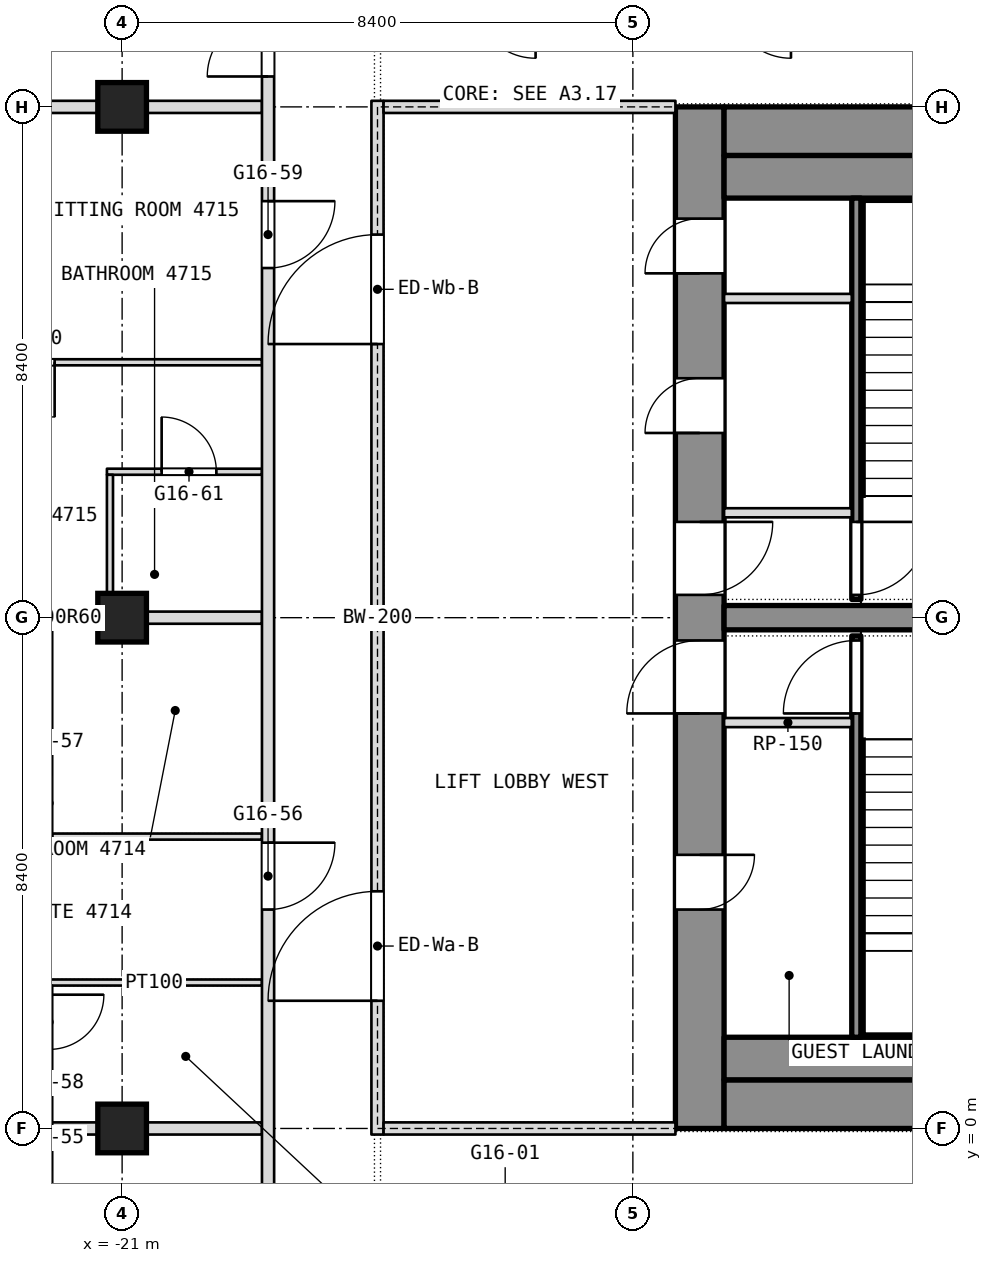
"""IFC4 building model, lengths in metres.
Left out: names, types, materials, properties, quantities, classifications, styles, units other than length and angle.
Written with IfcOpenShell. Run it as: python <this file> out.ifc"""

import sys

from ifc_helpers import new_model, si_unit, direction, frame, frame_2d, origin, origin_2d, place, context, subcontext, project, spatial, rectangle, extrude, element, fill, save


model = new_model("IFC4")
c1 = context("Model", 3, precision=1e-05, world=origin(), true_north=direction((0.0, 1.0)))
c2 = subcontext(c1, "Body", "Model", "MODEL_VIEW")
j1 = project(units=[si_unit("LENGTHUNIT", "METRE"), si_unit("PLANEANGLEUNIT", "RADIAN")], contexts=[c1])
p1 = place(None, origin())
s1 = spatial("IfcSite", under=j1, at=p1, CompositionType="ELEMENT")
p2 = place(p1, origin())
s2 = spatial("IfcBuilding", under=s1, at=p2, CompositionType="ELEMENT")
p3 = place(p2, frame((0.0, 0.0, 205.7)))
s3 = spatial("IfcBuildingStorey", under=s2, at=p3, CompositionType="ELEMENT", Elevation=205.7)
p4 = place(p3, frame((-11.5, 0.0, 0.0), z_axis=(0.0, 0.0, 1.0), x_axis=(0.0, 1.0, 0.0)))
e1 = element("IfcWall", 1, at=p4, inside=s3, PredefinedType="SHEAR", context=c2, shape_type="SweptSolid", body=[
    extrude(rectangle(XDim=16.8, YDim=0.8, at=frame_2d((8.4, 0.0))), origin(), (0.0, 0.0, 1.0), 3.6),
])
p5 = place(p4, frame((3.6, 0.0, 0.0)))
e2 = element("IfcOpeningElement", 2, at=p5, cuts=e1, PredefinedType="OPENING", context=c2, shape_type="SweptSolid", body=[
    extrude(rectangle(XDim=0.9, YDim=2.1, at=frame_2d((0.45, 1.05))), frame((0.0, 0.4, 0.0), z_axis=(0.0, -1.0, 0.0), x_axis=(1.0, 0.0, 0.0)), (0.0, 0.0, 1.0), 0.8),
])
p6 = place(p4, frame((6.825, 0.0, 0.0)))
e3 = element("IfcOpeningElement", 3, at=p6, cuts=e1, PredefinedType="OPENING", context=c2, shape_type="SweptSolid", body=[
    extrude(rectangle(XDim=1.2, YDim=2.1, at=frame_2d((0.6, 1.05))), frame((0.0, 0.4, 0.0), z_axis=(0.0, -1.0, 0.0), x_axis=(1.0, 0.0, 0.0)), (0.0, 0.0, 1.0), 0.8),
])
p7 = place(p4, frame((14.062, 0.0, 0.0)))
e4 = element("IfcOpeningElement", 4, at=p7, cuts=e1, PredefinedType="OPENING", context=c2, shape_type="SweptSolid", body=[
    extrude(rectangle(XDim=0.9, YDim=2.1, at=frame_2d((0.45, 1.05))), frame((0.0, 0.4, 0.0), z_axis=(0.0, -1.0, 0.0), x_axis=(1.0, 0.0, 0.0)), (0.0, 0.0, 1.0), 0.8),
])
p8 = place(p4, frame((11.438, 0.0, 0.0)))
e5 = element("IfcOpeningElement", 5, at=p8, cuts=e1, PredefinedType="OPENING", context=c2, shape_type="SweptSolid", body=[
    extrude(rectangle(XDim=0.9, YDim=2.1, at=frame_2d((0.45, 1.05))), frame((0.0, 0.4, 0.0), z_axis=(0.0, -1.0, 0.0), x_axis=(1.0, 0.0, 0.0)), (0.0, 0.0, 1.0), 0.8),
])
p9 = place(p4, frame((8.775, 0.0, 0.0)))
e6 = element("IfcOpeningElement", 6, at=p9, cuts=e1, PredefinedType="OPENING", context=c2, shape_type="SweptSolid", body=[
    extrude(rectangle(XDim=1.2, YDim=2.1, at=frame_2d((0.6, 1.05))), frame((0.0, 0.4, 0.0), z_axis=(0.0, -1.0, 0.0), x_axis=(1.0, 0.0, 0.0)), (0.0, 0.0, 1.0), 0.8),
])
for number, where, z_axis, x_axis in (
    (7, (-11.1, 0.4, 0.0), (0.0, 0.0, 1.0), (1.0, 0.0, 0.0)),
    (8, (-11.1, 16.4, 0.0), (0.0, 0.0, 1.0), (1.0, 0.0, 0.0)),
):
    element("IfcWall", number, at=place(p3, frame(where, z_axis=z_axis, x_axis=x_axis)), inside=s3, PredefinedType="SHEAR", context=c2, shape_type="SweptSolid", body=[
        extrude(rectangle(XDim=22.2, YDim=0.8, at=frame_2d((11.1, 0.0))), origin(), (0.0, 0.0, 1.0), 3.6),
    ])
p10 = place(p3, frame((-11.1, 8.4, 0.0), z_axis=(0.0, 0.0, 1.0), x_axis=(1.0, 0.0, 0.0)))
e9 = element("IfcWall", 9, at=p10, inside=s3, PredefinedType="SHEAR", context=c2, shape_type="SweptSolid", body=[
    extrude(rectangle(XDim=6.7, YDim=0.4, at=frame_2d((3.35, 0.0))), origin(), (0.0, 0.0, 1.0), 3.6),
])
for number, where, z_axis, x_axis in (
    (10, (-21.0, 0.0, 0.0), (0.0, 0.0, 1.0), (1.0, 0.0, 0.0)),
    (11, (-21.0, 8.4, 0.0), (0.0, 0.0, 1.0), (1.0, 0.0, 0.0)),
    (12, (-21.0, 16.8, 0.0), (0.0, 0.0, 1.0), (1.0, 0.0, 0.0)),
):
    element("IfcColumn", number, at=place(p3, frame(where, z_axis=z_axis, x_axis=x_axis)), inside=s3, PredefinedType="COLUMN", context=c2, shape_type="SweptSolid", body=[
        extrude(rectangle(XDim=0.8, YDim=0.8, at=origin_2d()), origin(), (0.0, 0.0, 1.0), 3.6),
    ])
p11 = place(p3, frame((-25.5, 0.0, 0.0), z_axis=(0.0, 0.0, 1.0), x_axis=(1.0, 0.0, 0.0)))
e13 = element("IfcWall", 13, at=p11, inside=s3, PredefinedType="PARTITIONING", context=c2, shape_type="SweptSolid", body=[
    extrude(rectangle(XDim=6.8, YDim=0.2, at=frame_2d((3.4, 0.0))), origin(), (0.0, 0.0, 1.0), 2.94),
])
p12 = place(p3, frame((-22.25, 2.4, 0.0), z_axis=(0.0, 0.0, 1.0), x_axis=(1.0, 0.0, 0.0)))
e14 = element("IfcWall", 14, at=p12, inside=s3, PredefinedType="PARTITIONING", context=c2, shape_type="SweptSolid", body=[
    extrude(rectangle(XDim=3.55, YDim=0.1, at=frame_2d((1.775, 0.0))), origin(), (0.0, 0.0, 1.0), 3.34),
])
p13 = place(p3, frame((-22.15, 4.8, 0.0), z_axis=(0.0, 0.0, 1.0), x_axis=(1.0, 0.0, 0.0)))
e15 = element("IfcWall", 15, at=p13, inside=s3, PredefinedType="PARTITIONING", context=c2, shape_type="SweptSolid", body=[
    extrude(rectangle(XDim=3.45, YDim=0.1, at=frame_2d((1.725, 0.0))), origin(), (0.0, 0.0, 1.0), 3.34),
])
p14 = place(p3, frame((-25.5, 8.4, 0.0), z_axis=(0.0, 0.0, 1.0), x_axis=(1.0, 0.0, 0.0)))
e16 = element("IfcWall", 16, at=p14, inside=s3, PredefinedType="PARTITIONING", context=c2, shape_type="SweptSolid", body=[
    extrude(rectangle(XDim=6.8, YDim=0.2, at=frame_2d((3.4, 0.0))), origin(), (0.0, 0.0, 1.0), 2.94),
])
p15 = place(p3, frame((-21.25, 10.8, 0.0), z_axis=(0.0, 0.0, 1.0), x_axis=(1.0, 0.0, 0.0)))
e17 = element("IfcWall", 17, at=p15, inside=s3, PredefinedType="PARTITIONING", context=c2, shape_type="SweptSolid", body=[
    extrude(rectangle(XDim=2.55, YDim=0.1, at=frame_2d((1.275, 0.0))), origin(), (0.0, 0.0, 1.0), 3.34),
])
p16 = place(p15, frame((0.9, 0.0, 0.0)))
e18 = element("IfcOpeningElement", 18, at=p16, cuts=e17, PredefinedType="OPENING", context=c2, shape_type="SweptSolid", body=[
    extrude(rectangle(XDim=0.9, YDim=2.1, at=frame_2d((0.45, 1.05))), frame((0.0, 0.05, 0.0), z_axis=(0.0, -1.0, 0.0), x_axis=(1.0, 0.0, 0.0)), (0.0, 0.0, 1.0), 0.1),
])
p17 = place(p3, frame((-25.5, 12.6, 0.0), z_axis=(0.0, 0.0, 1.0), x_axis=(1.0, 0.0, 0.0)))
e19 = element("IfcWall", 19, at=p17, inside=s3, PredefinedType="PARTITIONING", context=c2, shape_type="SweptSolid", body=[
    extrude(rectangle(XDim=6.8, YDim=0.1, at=frame_2d((3.4, 0.0))), origin(), (0.0, 0.0, 1.0), 3.34),
])
p18 = place(p17, frame((2.49, 0.0, 0.0)))
e20 = element("IfcOpeningElement", 20, at=p18, cuts=e19, PredefinedType="OPENING", context=c2, shape_type="SweptSolid", body=[
    extrude(rectangle(XDim=0.9, YDim=2.1, at=frame_2d((0.45, 1.05))), frame((0.0, 0.05, 0.0), z_axis=(0.0, -1.0, 0.0), x_axis=(1.0, 0.0, 0.0)), (0.0, 0.0, 1.0), 0.1),
])
p19 = place(p3, frame((-25.447, 16.8, 0.0), z_axis=(0.0, 0.0, 1.0), x_axis=(1.0, 0.0, 0.0)))
e21 = element("IfcWall", 21, at=p19, inside=s3, PredefinedType="PARTITIONING", context=c2, shape_type="SweptSolid", body=[
    extrude(rectangle(XDim=6.747, YDim=0.2, at=frame_2d((3.374, 0.0))), origin(), (0.0, 0.0, 1.0), 2.94),
])
p20 = place(p3, frame((-18.6, -26.751, 0.0), z_axis=(0.0, 0.0, 1.0), x_axis=(0.0, 1.0, 0.0)))
e22 = element("IfcWall", 22, at=p20, inside=s3, PredefinedType="PARTITIONING", context=c2, shape_type="SweptSolid", body=[
    extrude(rectangle(XDim=49.091, YDim=0.2, at=frame_2d((24.545, 0.0))), origin(), (0.0, 0.0, 1.0), 3.34),
])
p21 = place(p20, frame((4.576, 0.0, 0.0)))
e23 = element("IfcOpeningElement", 23, at=p21, cuts=e22, PredefinedType="OPENING", context=c2, shape_type="SweptSolid", body=[
    extrude(rectangle(XDim=1.1, YDim=2.1, at=frame_2d((0.55, 1.05))), frame((0.0, 0.1, 0.0), z_axis=(0.0, -1.0, 0.0), x_axis=(1.0, 0.0, 0.0)), (0.0, 0.0, 1.0), 0.2),
])
p22 = place(p20, frame((10.351, 0.0, 0.0)))
e24 = element("IfcOpeningElement", 24, at=p22, cuts=e22, PredefinedType="OPENING", context=c2, shape_type="SweptSolid", body=[
    extrude(rectangle(XDim=1.0, YDim=2.1, at=frame_2d((0.5, 1.05))), frame((0.0, 0.1, 0.0), z_axis=(0.0, -1.0, 0.0), x_axis=(1.0, 0.0, 0.0)), (0.0, 0.0, 1.0), 0.2),
])
p23 = place(p20, frame((16.951, 0.0, 0.0)))
e25 = element("IfcOpeningElement", 25, at=p23, cuts=e22, PredefinedType="OPENING", context=c2, shape_type="SweptSolid", body=[
    extrude(rectangle(XDim=1.0, YDim=2.1, at=frame_2d((0.5, 1.05))), frame((0.0, 0.1, 0.0), z_axis=(0.0, -1.0, 0.0), x_axis=(1.0, 0.0, 0.0)), (0.0, 0.0, 1.0), 0.2),
])
p24 = place(p20, frame((22.051, 0.0, 0.0)))
e26 = element("IfcOpeningElement", 26, at=p24, cuts=e22, PredefinedType="OPENING", context=c2, shape_type="SweptSolid", body=[
    extrude(rectangle(XDim=1.1, YDim=2.1, at=frame_2d((0.55, 1.05))), frame((0.0, 0.1, 0.0), z_axis=(0.0, -1.0, 0.0), x_axis=(1.0, 0.0, 0.0)), (0.0, 0.0, 1.0), 0.2),
])
p25 = place(p20, frame((30.351, 0.0, 0.0)))
e27 = element("IfcOpeningElement", 27, at=p25, cuts=e22, PredefinedType="OPENING", context=c2, shape_type="SweptSolid", body=[
    extrude(rectangle(XDim=1.1, YDim=2.1, at=frame_2d((0.55, 1.05))), frame((0.0, 0.1, 0.0), z_axis=(0.0, -1.0, 0.0), x_axis=(1.0, 0.0, 0.0)), (0.0, 0.0, 1.0), 0.2),
])
p26 = place(p20, frame((40.901, 0.0, 0.0)))
e28 = element("IfcOpeningElement", 28, at=p26, cuts=e22, PredefinedType="OPENING", context=c2, shape_type="SweptSolid", body=[
    extrude(rectangle(XDim=1.1, YDim=2.1, at=frame_2d((0.55, 1.05))), frame((0.0, 0.1, 0.0), z_axis=(0.0, -1.0, 0.0), x_axis=(1.0, 0.0, 0.0)), (0.0, 0.0, 1.0), 0.2),
])
p27 = place(p20, frame((44.051, 0.0, 0.0)))
e29 = element("IfcOpeningElement", 29, at=p27, cuts=e22, PredefinedType="OPENING", context=c2, shape_type="SweptSolid", body=[
    extrude(rectangle(XDim=1.0, YDim=2.1, at=frame_2d((0.5, 1.05))), frame((0.0, 0.1, 0.0), z_axis=(0.0, -1.0, 0.0), x_axis=(1.0, 0.0, 0.0)), (0.0, 0.0, 1.0), 0.2),
])
p28 = place(p3, frame((-21.2, 8.5, 0.0), z_axis=(0.0, 0.0, 1.0), x_axis=(0.0, 1.0, 0.0)))
e30 = element("IfcWall", 30, at=p28, inside=s3, PredefinedType="PARTITIONING", context=c2, shape_type="SweptSolid", body=[
    extrude(rectangle(XDim=2.25, YDim=0.1, at=frame_2d((1.125, 0.0))), origin(), (0.0, 0.0, 1.0), 3.34),
])
for number, where, z_axis, x_axis in (
    (31, (-11.1, 1.15, 0.0), (0.0, 0.0, 1.0), (1.0, 0.0, 0.0)),
    (32, (-11.1, 15.65, 0.0), (0.0, 0.0, 1.0), (1.0, 0.0, 0.0)),
):
    element("IfcWall", number, at=place(p3, frame(where, z_axis=z_axis, x_axis=x_axis)), inside=s3, PredefinedType="PARTITIONING", context=c2, shape_type="SweptSolid", body=[
        extrude(rectangle(XDim=22.2, YDim=0.7, at=frame_2d((11.1, 0.0))), origin(), (0.0, 0.0, 1.0), 3.34),
    ])
p29 = place(p3, frame((-8.925, 1.5, 0.0), z_axis=(0.0, 0.0, 1.0), x_axis=(0.0, 1.0, 0.0)))
e33 = element("IfcWall", 33, at=p29, inside=s3, PredefinedType="SHEAR", context=c2, shape_type="SweptSolid", body=[
    extrude(rectangle(XDim=6.6, YDim=0.15, at=frame_2d((3.3, 0.0))), origin(), (0.0, 0.0, 1.0), 3.34),
])
p30 = place(p29, frame((5.325, 0.0, 0.0)))
e34 = element("IfcOpeningElement", 34, at=p30, cuts=e33, PredefinedType="OPENING", context=c2, shape_type="SweptSolid", body=[
    extrude(rectangle(XDim=1.2, YDim=2.1, at=frame_2d((0.6, 1.05))), frame((0.0, 0.075, 0.0), z_axis=(0.0, -1.0, 0.0), x_axis=(1.0, 0.0, 0.0)), (0.0, 0.0, 1.0), 0.15),
])
p31 = place(p3, frame((-11.1, 6.675, 0.0), z_axis=(0.0, 0.0, 1.0), x_axis=(1.0, 0.0, 0.0)))
e35 = element("IfcWall", 35, at=p31, inside=s3, PredefinedType="PARTITIONING", context=c2, shape_type="SweptSolid", body=[
    extrude(rectangle(XDim=2.1, YDim=0.15, at=frame_2d((1.05, 0.0))), origin(), (0.0, 0.0, 1.0), 3.34),
])
p32 = place(p3, frame((-8.925, 8.7, 0.0), z_axis=(0.0, 0.0, 1.0), x_axis=(0.0, 1.0, 0.0)))
e36 = element("IfcWall", 36, at=p32, inside=s3, PredefinedType="SHEAR", context=c2, shape_type="SweptSolid", body=[
    extrude(rectangle(XDim=6.6, YDim=0.15, at=frame_2d((3.3, 0.0))), origin(), (0.0, 0.0, 1.0), 3.34),
])
p33 = place(p32, frame((0.075, 0.0, 0.0)))
e37 = element("IfcOpeningElement", 37, at=p33, cuts=e36, PredefinedType="OPENING", context=c2, shape_type="SweptSolid", body=[
    extrude(rectangle(XDim=1.2, YDim=2.1, at=frame_2d((0.6, 1.05))), frame((0.0, 0.075, 0.0), z_axis=(0.0, -1.0, 0.0), x_axis=(1.0, 0.0, 0.0)), (0.0, 0.0, 1.0), 0.15),
])
for number, where, z_axis, x_axis in (
    (38, (-11.1, 10.125, 0.0), (0.0, 0.0, 1.0), (1.0, 0.0, 0.0)),
    (39, (-11.1, 13.65, 0.0), (0.0, 0.0, 1.0), (1.0, 0.0, 0.0)),
):
    element("IfcWall", number, at=place(p3, frame(where, z_axis=z_axis, x_axis=x_axis)), inside=s3, PredefinedType="PARTITIONING", context=c2, shape_type="SweptSolid", body=[
        extrude(rectangle(XDim=2.1, YDim=0.15, at=frame_2d((1.05, 0.0))), origin(), (0.0, 0.0, 1.0), 3.34),
    ])
p34 = place(p3, frame((-16.8, -0.1, 0.0), z_axis=(0.0, 0.0, 1.0), x_axis=(0.0, 1.0, 0.0)))
e40 = element("IfcWall", 40, at=p34, inside=s3, PredefinedType="PARTITIONING", context=c2, shape_type="SweptSolid", body=[
    extrude(rectangle(XDim=17.0, YDim=0.2, at=frame_2d((8.5, 0.0))), origin(), (0.0, 0.0, 1.0), 3.34),
])
p35 = place(p34, frame((2.2, 0.0, 0.0)))
e41 = element("IfcOpeningElement", 41, at=p35, cuts=e40, PredefinedType="OPENING", context=c2, shape_type="SweptSolid", body=[
    extrude(rectangle(XDim=1.8, YDim=2.1, at=frame_2d((0.9, 1.05))), frame((0.0, 0.1, 0.0), z_axis=(0.0, -1.0, 0.0), x_axis=(1.0, 0.0, 0.0)), (0.0, 0.0, 1.0), 0.2),
])
p36 = place(p34, frame((13.0, 0.0, 0.0)))
e42 = element("IfcOpeningElement", 42, at=p36, cuts=e40, PredefinedType="OPENING", context=c2, shape_type="SweptSolid", body=[
    extrude(rectangle(XDim=1.8, YDim=2.1, at=frame_2d((0.9, 1.05))), frame((0.0, 0.1, 0.0), z_axis=(0.0, -1.0, 0.0), x_axis=(1.0, 0.0, 0.0)), (0.0, 0.0, 1.0), 0.2),
])
for number, where, z_axis, x_axis in (
    (43, (-16.7, 0.0, 0.0), (0.0, 0.0, 1.0), (1.0, 0.0, 0.0)),
    (44, (-16.7, 16.8, 0.0), (0.0, 0.0, 1.0), (1.0, 0.0, 0.0)),
):
    element("IfcWall", number, at=place(p3, frame(where, z_axis=z_axis, x_axis=x_axis)), inside=s3, PredefinedType="PARTITIONING", context=c2, shape_type="SweptSolid", body=[
        extrude(rectangle(XDim=4.8, YDim=0.2, at=frame_2d((2.4, 0.0))), origin(), (0.0, 0.0, 1.0), 2.94),
    ])
p37 = place(p16, origin())
e45 = element("IfcDoor", 45, at=p37, inside=s3, OperationType="SINGLE_SWING_LEFT", PredefinedType="DOOR", context=c2, shape_type="SweptSolid", body=[
    extrude(rectangle(XDim=0.9, YDim=2.1, at=frame_2d((0.45, 1.05))), frame((0.0, 0.025, 0.0), z_axis=(0.0, -1.0, 0.0), x_axis=(1.0, 0.0, 0.0)), (0.0, 0.0, 1.0), 0.05),
])
fill(e18, e45)
p38 = place(p18, origin())
e46 = element("IfcDoor", 46, at=p38, inside=s3, OperationType="SINGLE_SWING_RIGHT", PredefinedType="DOOR", context=c2, shape_type="SweptSolid", body=[
    extrude(rectangle(XDim=0.9, YDim=2.1, at=frame_2d((0.45, 1.05))), frame((0.0, 0.025, 0.0), z_axis=(0.0, -1.0, 0.0), x_axis=(1.0, 0.0, 0.0)), (0.0, 0.0, 1.0), 0.05),
])
fill(e20, e46)
p39 = place(p25, origin())
e47 = element("IfcDoor", 47, at=p39, inside=s3, OperationType="SINGLE_SWING_RIGHT", PredefinedType="DOOR", context=c2, shape_type="SweptSolid", body=[
    extrude(rectangle(XDim=1.1, YDim=2.1, at=frame_2d((0.55, 1.05))), frame((0.0, 0.025, 0.0), z_axis=(0.0, -1.0, 0.0), x_axis=(1.0, 0.0, 0.0)), (0.0, 0.0, 1.0), 0.05),
])
fill(e27, e47)
p40 = place(p26, origin())
e48 = element("IfcDoor", 48, at=p40, inside=s3, OperationType="SINGLE_SWING_RIGHT", PredefinedType="DOOR", context=c2, shape_type="SweptSolid", body=[
    extrude(rectangle(XDim=1.1, YDim=2.1, at=frame_2d((0.55, 1.05))), frame((0.0, 0.025, 0.0), z_axis=(0.0, -1.0, 0.0), x_axis=(1.0, 0.0, 0.0)), (0.0, 0.0, 1.0), 0.05),
])
fill(e28, e48)
p41 = place(p27, origin())
e49 = element("IfcDoor", 49, at=p41, inside=s3, OperationType="SINGLE_SWING_LEFT", PredefinedType="DOOR", context=c2, shape_type="SweptSolid", body=[
    extrude(rectangle(XDim=1.0, YDim=2.1, at=frame_2d((0.5, 1.05))), frame((0.0, 0.025, 0.0), z_axis=(0.0, -1.0, 0.0), x_axis=(1.0, 0.0, 0.0)), (0.0, 0.0, 1.0), 0.05),
])
fill(e29, e49)
p42 = place(p5, origin())
e50 = element("IfcDoor", 50, at=p42, inside=s3, OperationType="SINGLE_SWING_LEFT", PredefinedType="DOOR", context=c2, shape_type="SweptSolid", body=[
    extrude(rectangle(XDim=0.9, YDim=2.1, at=frame_2d((0.45, 1.05))), frame((0.0, 0.025, 0.0), z_axis=(0.0, -1.0, 0.0), x_axis=(1.0, 0.0, 0.0)), (0.0, 0.0, 1.0), 0.05),
])
fill(e2, e50)
p43 = place(p6, origin())
e51 = element("IfcDoor", 51, at=p43, inside=s3, OperationType="SINGLE_SWING_LEFT", PredefinedType="DOOR", context=c2, shape_type="SweptSolid", body=[
    extrude(rectangle(XDim=1.2, YDim=2.1, at=frame_2d((0.6, 1.05))), frame((0.0, 0.025, 0.0), z_axis=(0.0, -1.0, 0.0), x_axis=(1.0, 0.0, 0.0)), (0.0, 0.0, 1.0), 0.05),
])
fill(e3, e51)
p44 = place(p30, origin())
e52 = element("IfcDoor", 52, at=p44, inside=s3, OperationType="SINGLE_SWING_LEFT", PredefinedType="DOOR", context=c2, shape_type="SweptSolid", body=[
    extrude(rectangle(XDim=1.2, YDim=2.1, at=frame_2d((0.6, 1.05))), frame((0.0, 0.025, 0.0), z_axis=(0.0, -1.0, 0.0), x_axis=(1.0, 0.0, 0.0)), (0.0, 0.0, 1.0), 0.05),
])
fill(e34, e52)
p45 = place(p7, origin())
e53 = element("IfcDoor", 53, at=p45, inside=s3, OperationType="SINGLE_SWING_LEFT", PredefinedType="DOOR", context=c2, shape_type="SweptSolid", body=[
    extrude(rectangle(XDim=0.9, YDim=2.1, at=frame_2d((0.45, 1.05))), frame((0.0, 0.025, 0.0), z_axis=(0.0, -1.0, 0.0), x_axis=(1.0, 0.0, 0.0)), (0.0, 0.0, 1.0), 0.05),
])
fill(e4, e53)
p46 = place(p8, origin())
e54 = element("IfcDoor", 54, at=p46, inside=s3, OperationType="SINGLE_SWING_LEFT", PredefinedType="DOOR", context=c2, shape_type="SweptSolid", body=[
    extrude(rectangle(XDim=0.9, YDim=2.1, at=frame_2d((0.45, 1.05))), frame((0.0, 0.025, 0.0), z_axis=(0.0, -1.0, 0.0), x_axis=(1.0, 0.0, 0.0)), (0.0, 0.0, 1.0), 0.05),
])
fill(e5, e54)
p47 = place(p9, origin())
e55 = element("IfcDoor", 55, at=p47, inside=s3, OperationType="SINGLE_SWING_LEFT", PredefinedType="DOOR", context=c2, shape_type="SweptSolid", body=[
    extrude(rectangle(XDim=1.2, YDim=2.1, at=frame_2d((0.6, 1.05))), frame((0.0, 0.025, 0.0), z_axis=(0.0, -1.0, 0.0), x_axis=(1.0, 0.0, 0.0)), (0.0, 0.0, 1.0), 0.05),
])
fill(e6, e55)
p48 = place(p33, origin())
e56 = element("IfcDoor", 56, at=p48, inside=s3, OperationType="SINGLE_SWING_LEFT", PredefinedType="DOOR", context=c2, shape_type="SweptSolid", body=[
    extrude(rectangle(XDim=1.2, YDim=2.1, at=frame_2d((0.6, 1.05))), frame((0.0, 0.025, 0.0), z_axis=(0.0, -1.0, 0.0), x_axis=(1.0, 0.0, 0.0)), (0.0, 0.0, 1.0), 0.05),
])
fill(e37, e56)
p49 = place(p35, origin())
e57 = element("IfcDoor", 57, at=p49, inside=s3, OperationType="DOUBLE_DOOR_SINGLE_SWING", PredefinedType="DOOR", context=c2, shape_type="SweptSolid", body=[
    extrude(rectangle(XDim=1.8, YDim=2.1, at=frame_2d((0.9, 1.05))), frame((0.0, 0.025, 0.0), z_axis=(0.0, -1.0, 0.0), x_axis=(1.0, 0.0, 0.0)), (0.0, 0.0, 1.0), 0.05),
])
fill(e41, e57)
p50 = place(p36, origin())
e58 = element("IfcDoor", 58, at=p50, inside=s3, OperationType="DOUBLE_DOOR_SINGLE_SWING", PredefinedType="DOOR", context=c2, shape_type="SweptSolid", body=[
    extrude(rectangle(XDim=1.8, YDim=2.1, at=frame_2d((0.9, 1.05))), frame((0.0, 0.025, 0.0), z_axis=(0.0, -1.0, 0.0), x_axis=(1.0, 0.0, 0.0)), (0.0, 0.0, 1.0), 0.05),
])
fill(e42, e58)
save(model, sys.argv[1])
